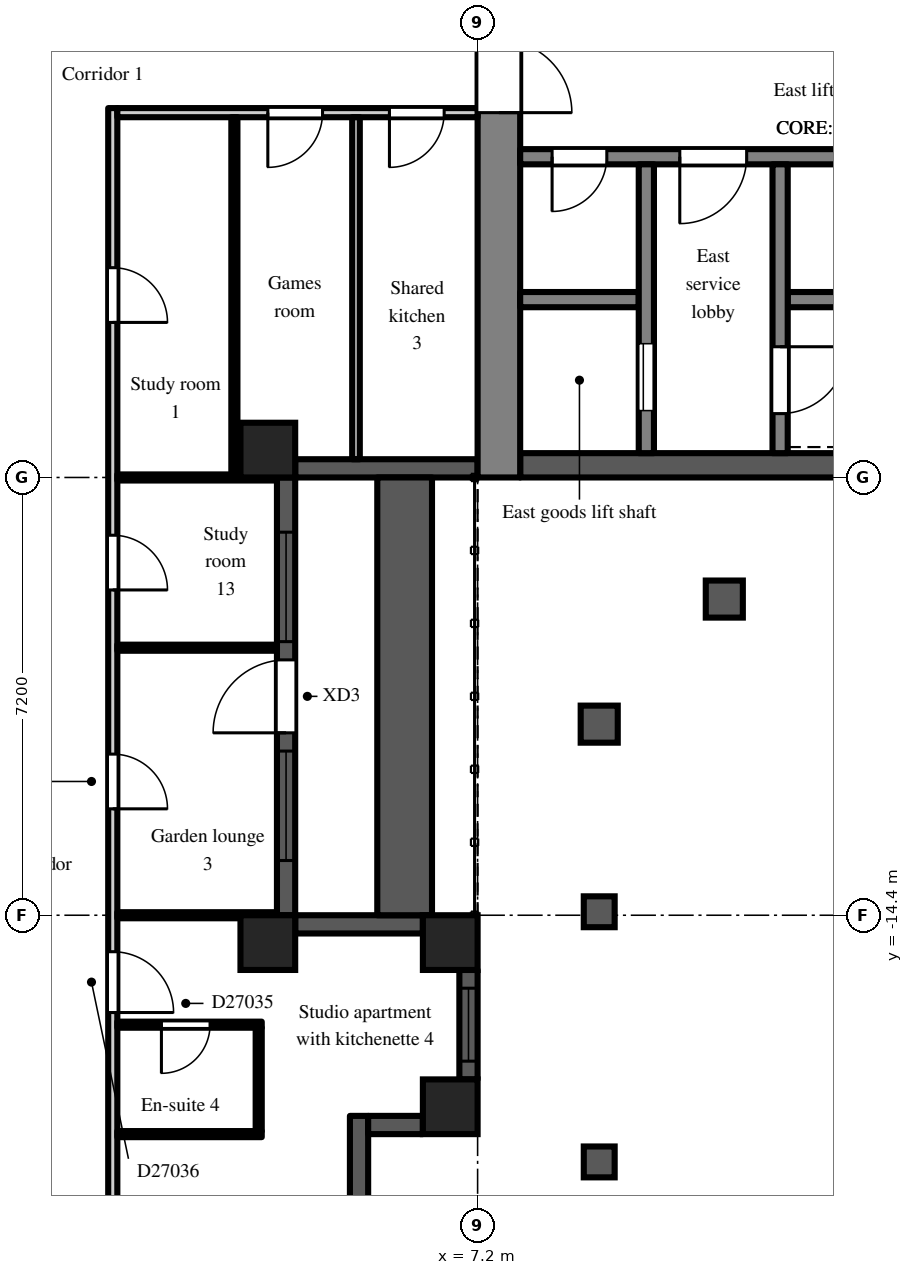
"""IFC4 building model, lengths in metres.
Left out: names, types, materials, properties, quantities, classifications, styles, units other than length and angle.
Written with IfcOpenShell. Run it as: python <this file> out.ifc"""

import sys

from ifc_helpers import new_model, si_unit, direction, frame, frame_2d, origin, origin_2d, place, context, subcontext, project, spatial, rectangle, extrude, element, fill, save


model = new_model("IFC4")
c1 = context("Model", 3, precision=1e-05, world=origin(), true_north=direction((0.0, 1.0)))
c2 = subcontext(c1, "Body", "Model", "MODEL_VIEW")
j1 = project(units=[si_unit("LENGTHUNIT", "METRE"), si_unit("PLANEANGLEUNIT", "RADIAN")], contexts=[c1])
p1 = place(None, origin())
s1 = spatial("IfcSite", under=j1, at=p1, CompositionType="ELEMENT")
p2 = place(p1, origin())
s2 = spatial("IfcBuilding", under=s1, at=p2, CompositionType="ELEMENT")
p3 = place(p2, frame((0.0, 0.0, 191.7)))
s3 = spatial("IfcBuildingStorey", under=s2, at=p3, CompositionType="ELEMENT", Elevation=191.7)
for number, where, z_axis, x_axis in (
    (1, (3.75, -14.85, 0.0), (0.0, 0.0, 1.0), (1.0, 0.0, 0.0)),
    (2, (3.75, -6.75, 0.0), (0.0, 0.0, 1.0), (1.0, 0.0, 0.0)),
    (3, (6.75, -17.55, 0.0), (0.0, 0.0, 1.0), (1.0, 0.0, 0.0)),
    (4, (6.75, -14.85, 0.0), (0.0, 0.0, 1.0), (1.0, 0.0, 0.0)),
):
    element("IfcColumn", number, at=place(p3, frame(where, z_axis=z_axis, x_axis=x_axis)), inside=s3, PredefinedType="COLUMN", context=c2, shape_type="SweptSolid", body=[
        extrude(rectangle(XDim=0.9, YDim=0.9, at=origin_2d()), origin(), (0.0, 0.0, 1.0), 3.0),
    ])
p4 = place(p3, frame((5.25, -19.5, 0.0), z_axis=(0.0, 0.0, 1.0), x_axis=(0.0, 1.0, 0.0)))
e5 = element("IfcWall", 5, at=p4, inside=s3, PredefinedType="SOLIDWALL", context=c2, shape_type="SweptSolid", body=[
    extrude(rectangle(XDim=1.8, YDim=0.3, at=frame_2d((0.9, 0.0))), origin(), (0.0, 0.0, 1.0), 2.55),
])
p5 = place(p3, frame((5.4, -17.85, 0.0), z_axis=(0.0, 0.0, 1.0), x_axis=(1.0, 0.0, 0.0)))
e6 = element("IfcWall", 6, at=p5, inside=s3, PredefinedType="SOLIDWALL", context=c2, shape_type="SweptSolid", body=[
    extrude(rectangle(XDim=0.9, YDim=0.3, at=frame_2d((0.45, 0.0))), origin(), (0.0, 0.0, 1.0), 2.55),
])
p6 = place(p3, frame((7.05, -17.1, 0.0), z_axis=(0.0, 0.0, 1.0), x_axis=(0.0, 1.0, 0.0)))
e7 = element("IfcWall", 7, at=p6, inside=s3, PredefinedType="SOLIDWALL", context=c2, shape_type="SweptSolid", body=[
    extrude(rectangle(XDim=1.8, YDim=0.3, at=frame_2d((0.9, 0.0))), origin(), (0.0, 0.0, 1.0), 2.3),
])
p7 = place(p6, frame((0.3, 0.0, 0.2)))
e8 = element("IfcOpeningElement", 8, at=p7, cuts=e7, PredefinedType="OPENING", context=c2, shape_type="SweptSolid", body=[
    extrude(rectangle(XDim=1.2, YDim=1.85, at=frame_2d((0.6, 0.925))), frame((0.0, 0.16, 0.0), z_axis=(0.0, -1.0, 0.0), x_axis=(1.0, 0.0, 0.0)), (0.0, 0.0, 1.0), 0.32),
])
p8 = place(p3, frame((6.3, -14.55, 0.0), z_axis=(0.0, 0.0, 1.0), x_axis=(-1.0, 0.0, 0.0)))
e9 = element("IfcWall", 9, at=p8, inside=s3, PredefinedType="SOLIDWALL", context=c2, shape_type="SweptSolid", body=[
    extrude(rectangle(XDim=2.1, YDim=0.3, at=frame_2d((1.05, 0.0))), origin(), (0.0, 0.0, 1.0), 2.55),
])
p9 = place(p3, frame((4.05, -14.4, 0.0), z_axis=(0.0, 0.0, 1.0), x_axis=(0.0, 1.0, 0.0)))
e10 = element("IfcWall", 10, at=p9, inside=s3, PredefinedType="SOLIDWALL", context=c2, shape_type="SweptSolid", body=[
    extrude(rectangle(XDim=7.2, YDim=0.3, at=frame_2d((3.6, 0.0))), origin(), (0.0, 0.0, 1.0), 2.55),
])
p10 = place(p9, frame((3.0, 0.0, 0.0)))
e11 = element("IfcOpeningElement", 11, at=p10, cuts=e10, PredefinedType="OPENING", context=c2, shape_type="SweptSolid", body=[
    extrude(rectangle(XDim=1.2, YDim=2.05, at=frame_2d((0.6, 1.025))), frame((0.0, 0.16, 0.0), z_axis=(0.0, -1.0, 0.0), x_axis=(1.0, 0.0, 0.0)), (0.0, 0.0, 1.0), 0.32),
])
p11 = place(p9, frame((0.9, 0.0, 0.2)))
e12 = element("IfcOpeningElement", 12, at=p11, cuts=e10, PredefinedType="OPENING", context=c2, shape_type="SweptSolid", body=[
    extrude(rectangle(XDim=1.8, YDim=1.85, at=frame_2d((0.9, 0.925))), frame((0.0, 0.16, 0.0), z_axis=(0.0, -1.0, 0.0), x_axis=(1.0, 0.0, 0.0)), (0.0, 0.0, 1.0), 0.32),
])
p12 = place(p9, frame((4.5, 0.0, 0.2)))
e13 = element("IfcOpeningElement", 13, at=p12, cuts=e10, PredefinedType="OPENING", context=c2, shape_type="SweptSolid", body=[
    extrude(rectangle(XDim=1.8, YDim=1.85, at=frame_2d((0.9, 0.925))), frame((0.0, 0.16, 0.0), z_axis=(0.0, -1.0, 0.0), x_axis=(1.0, 0.0, 0.0)), (0.0, 0.0, 1.0), 0.32),
])
p13 = place(p3, frame((4.2, -7.05, 0.0), z_axis=(0.0, 0.0, 1.0), x_axis=(1.0, 0.0, 0.0)))
e14 = element("IfcWall", 14, at=p13, inside=s3, PredefinedType="SOLIDWALL", context=c2, shape_type="SweptSolid", body=[
    extrude(rectangle(XDim=3.0, YDim=0.3, at=frame_2d((1.5, 0.0))), origin(), (0.0, 0.0, 1.0), 2.55),
])
p14 = place(p3, frame((6.0, -14.4, 0.0), z_axis=(0.0, 0.0, 1.0), x_axis=(0.0, 1.0, 0.0)))
e15 = element("IfcWall", 15, at=p14, inside=s3, PredefinedType="PARAPET", context=c2, shape_type="SweptSolid", body=[
    extrude(rectangle(XDim=7.2, YDim=0.9, at=frame_2d((3.6, 0.0))), origin(), (0.0, 0.0, 1.0), 0.8),
])
p15 = place(p3, frame((7.55, -7.2, 0.0), z_axis=(0.0, 0.0, 1.0), x_axis=(0.0, 1.0, 0.0)))
e16 = element("IfcWall", 16, at=p15, inside=s3, PredefinedType="SHEAR", context=c2, shape_type="SweptSolid", body=[
    extrude(rectangle(XDim=14.4, YDim=0.7, at=frame_2d((7.2, 0.0))), origin(), (0.0, 0.0, 1.0), 2.55),
])
p16 = place(p15, frame((6.0, 0.0, 0.0)))
e17 = element("IfcOpeningElement", 17, at=p16, cuts=e16, PredefinedType="OPENING", context=c2, shape_type="SweptSolid", body=[
    extrude(rectangle(XDim=2.4, YDim=2.2, at=frame_2d((1.2, 1.1))), frame((0.0, 0.36, 0.0), z_axis=(0.0, -1.0, 0.0), x_axis=(1.0, 0.0, 0.0)), (0.0, 0.0, 1.0), 0.72),
])
p17 = place(p3, frame((7.9, -7.0, 0.0), z_axis=(0.0, 0.0, 1.0), x_axis=(1.0, 0.0, 0.0)))
e18 = element("IfcWall", 18, at=p17, inside=s3, PredefinedType="SHEAR", context=c2, shape_type="SweptSolid", body=[
    extrude(rectangle(XDim=12.95, YDim=0.4, at=frame_2d((6.475, 0.0))), origin(), (0.0, 0.0, 1.0), 2.55),
])
p18 = place(p3, frame((7.9, -1.925, 0.0), z_axis=(0.0, 0.0, 1.0), x_axis=(1.0, 0.0, 0.0)))
e19 = element("IfcWall", 19, at=p18, inside=s3, PredefinedType="SHEAR", context=c2, shape_type="SweptSolid", body=[
    extrude(rectangle(XDim=12.95, YDim=0.25, at=frame_2d((6.475, 0.0))), origin(), (0.0, 0.0, 1.0), 2.55),
])
p19 = place(p18, frame((0.525, 0.0, 0.0)))
e20 = element("IfcOpeningElement", 20, at=p19, cuts=e19, PredefinedType="OPENING", context=c2, shape_type="SweptSolid", body=[
    extrude(rectangle(XDim=0.9, YDim=2.1, at=frame_2d((0.45, 1.05))), frame((0.0, 0.135, 0.0), z_axis=(0.0, -1.0, 0.0), x_axis=(1.0, 0.0, 0.0)), (0.0, 0.0, 1.0), 0.27),
])
p20 = place(p18, frame((2.625, 0.0, 0.0)))
e21 = element("IfcOpeningElement", 21, at=p20, cuts=e19, PredefinedType="OPENING", context=c2, shape_type="SweptSolid", body=[
    extrude(rectangle(XDim=1.1, YDim=2.1, at=frame_2d((0.55, 1.05))), frame((0.0, 0.135, 0.0), z_axis=(0.0, -1.0, 0.0), x_axis=(1.0, 0.0, 0.0)), (0.0, 0.0, 1.0), 0.27),
])
p21 = place(p18, frame((8.225, 0.0, 0.0)))
e22 = element("IfcOpeningElement", 22, at=p21, cuts=e19, PredefinedType="OPENING", context=c2, shape_type="SweptSolid", body=[
    extrude(rectangle(XDim=0.9, YDim=2.1, at=frame_2d((0.45, 1.05))), frame((0.0, 0.135, 0.0), z_axis=(0.0, -1.0, 0.0), x_axis=(1.0, 0.0, 0.0)), (0.0, 0.0, 1.0), 0.27),
])
p22 = place(p3, frame((7.9, -4.275, 0.0), z_axis=(0.0, 0.0, 1.0), x_axis=(1.0, 0.0, 0.0)))
e23 = element("IfcWall", 23, at=p22, inside=s3, PredefinedType="SHEAR", context=c2, shape_type="SweptSolid", body=[
    extrude(rectangle(XDim=1.95, YDim=0.25, at=frame_2d((0.975, 0.0))), origin(), (0.0, 0.0, 1.0), 2.55),
])
p23 = place(p3, frame((12.3, -4.275, 0.0), z_axis=(0.0, 0.0, 1.0), x_axis=(1.0, 0.0, 0.0)))
e24 = element("IfcWall", 24, at=p23, inside=s3, PredefinedType="SHEAR", context=c2, shape_type="SweptSolid", body=[
    extrude(rectangle(XDim=8.55, YDim=0.25, at=frame_2d((4.275, 0.0))), origin(), (0.0, 0.0, 1.0), 2.55),
])
p24 = place(p3, frame((9.975, -2.05, 0.0), z_axis=(0.0, 0.0, 1.0), x_axis=(0.0, -1.0, 0.0)))
e25 = element("IfcWall", 25, at=p24, inside=s3, PredefinedType="SHEAR", context=c2, shape_type="SweptSolid", body=[
    extrude(rectangle(XDim=4.75, YDim=0.25, at=frame_2d((2.375, 0.0))), origin(), (0.0, 0.0, 1.0), 2.55),
])
p25 = place(p24, frame((2.95, 0.0, 0.0)))
e26 = element("IfcOpeningElement", 26, at=p25, cuts=e25, PredefinedType="OPENING", context=c2, shape_type="SweptSolid", body=[
    extrude(rectangle(XDim=1.1, YDim=2.1, at=frame_2d((0.55, 1.05))), frame((0.0, 0.135, 0.0), z_axis=(0.0, -1.0, 0.0), x_axis=(1.0, 0.0, 0.0)), (0.0, 0.0, 1.0), 0.27),
])
p26 = place(p3, frame((12.175, -2.05, 0.0), z_axis=(0.0, 0.0, 1.0), x_axis=(0.0, -1.0, 0.0)))
e27 = element("IfcWall", 27, at=p26, inside=s3, PredefinedType="SHEAR", context=c2, shape_type="SweptSolid", body=[
    extrude(rectangle(XDim=4.75, YDim=0.25, at=frame_2d((2.375, 0.0))), origin(), (0.0, 0.0, 1.0), 2.55),
])
p27 = place(p26, frame((3.0, 0.0, 0.0)))
e28 = element("IfcOpeningElement", 28, at=p27, cuts=e27, PredefinedType="OPENING", context=c2, shape_type="SweptSolid", body=[
    extrude(rectangle(XDim=1.1, YDim=2.1, at=frame_2d((0.55, 1.05))), frame((0.0, 0.135, 0.0), z_axis=(0.0, -1.0, 0.0), x_axis=(1.0, 0.0, 0.0)), (0.0, 0.0, 1.0), 0.27),
])
p28 = place(p3, frame((1.2, -19.525, 0.0), z_axis=(0.0, 0.0, 1.0), x_axis=(0.0, 1.0, 0.0)))
e29 = element("IfcWall", 29, at=p28, inside=s3, PredefinedType="PARTITIONING", context=c2, shape_type="SweptSolid", body=[
    extrude(rectangle(XDim=18.4, YDim=0.15, at=frame_2d((9.2, 0.0))), origin(), (0.0, 0.0, 1.0), 2.55),
])
p29 = place(p28, frame((14.875, 0.0, 0.0)))
e30 = element("IfcOpeningElement", 30, at=p29, cuts=e29, PredefinedType="OPENING", context=c2, shape_type="SweptSolid", body=[
    extrude(rectangle(XDim=0.9, YDim=2.1, at=frame_2d((0.45, 1.05))), frame((0.0, 0.085, 0.0), z_axis=(0.0, -1.0, 0.0), x_axis=(1.0, 0.0, 0.0)), (0.0, 0.0, 1.0), 0.17),
])
p30 = place(p28, frame((10.475, 0.0, 0.0)))
e31 = element("IfcOpeningElement", 31, at=p30, cuts=e29, PredefinedType="OPENING", context=c2, shape_type="SweptSolid", body=[
    extrude(rectangle(XDim=0.9, YDim=2.1, at=frame_2d((0.45, 1.05))), frame((0.0, 0.085, 0.0), z_axis=(0.0, -1.0, 0.0), x_axis=(1.0, 0.0, 0.0)), (0.0, 0.0, 1.0), 0.17),
])
p31 = place(p28, frame((6.875, 0.0, 0.0)))
e32 = element("IfcOpeningElement", 32, at=p31, cuts=e29, PredefinedType="OPENING", context=c2, shape_type="SweptSolid", body=[
    extrude(rectangle(XDim=0.9, YDim=2.1, at=frame_2d((0.45, 1.05))), frame((0.0, 0.085, 0.0), z_axis=(0.0, -1.0, 0.0), x_axis=(1.0, 0.0, 0.0)), (0.0, 0.0, 1.0), 0.17),
])
p32 = place(p28, frame((3.525, 0.0, 0.0)))
e33 = element("IfcOpeningElement", 33, at=p32, cuts=e29, PredefinedType="OPENING", context=c2, shape_type="SweptSolid", body=[
    extrude(rectangle(XDim=1.0, YDim=2.1, at=frame_2d((0.5, 1.05))), frame((0.0, 0.085, 0.0), z_axis=(0.0, -1.0, 0.0), x_axis=(1.0, 0.0, 0.0)), (0.0, 0.0, 1.0), 0.17),
])
p33 = place(p3, frame((1.275, -18.0, 0.0), z_axis=(0.0, 0.0, 1.0), x_axis=(1.0, 0.0, 0.0)))
e34 = element("IfcWall", 34, at=p33, inside=s3, PredefinedType="PARTITIONING", context=c2, shape_type="SweptSolid", body=[
    extrude(rectangle(XDim=2.375, YDim=0.1, at=frame_2d((1.188, 0.0))), origin(), (0.0, 0.0, 1.0), 2.55),
])
p34 = place(p3, frame((1.275, -16.2, 0.0), z_axis=(0.0, 0.0, 1.0), x_axis=(1.0, 0.0, 0.0)))
e35 = element("IfcWall", 35, at=p34, inside=s3, PredefinedType="PARTITIONING", context=c2, shape_type="SweptSolid", body=[
    extrude(rectangle(XDim=2.375, YDim=0.1, at=frame_2d((1.188, 0.0))), origin(), (0.0, 0.0, 1.0), 2.55),
])
p35 = place(p34, frame((0.725, 0.0, 0.0)))
e36 = element("IfcOpeningElement", 36, at=p35, cuts=e35, PredefinedType="OPENING", context=c2, shape_type="SweptSolid", body=[
    extrude(rectangle(XDim=0.8, YDim=2.1, at=frame_2d((0.4, 1.05))), frame((0.0, 0.06, 0.0), z_axis=(0.0, -1.0, 0.0), x_axis=(1.0, 0.0, 0.0)), (0.0, 0.0, 1.0), 0.12),
])
for number, where, z_axis, x_axis in (
    (37, (1.275, -14.4, 0.0), (0.0, 0.0, 1.0), (1.0, 0.0, 0.0)),
    (38, (1.275, -10.0, 0.0), (0.0, 0.0, 1.0), (1.0, 0.0, 0.0)),
    (39, (1.275, -7.2, 0.0), (0.0, 0.0, 1.0), (1.0, 0.0, 0.0)),
):
    element("IfcWall", number, at=place(p3, frame(where, z_axis=z_axis, x_axis=x_axis)), inside=s3, PredefinedType="PARTITIONING", context=c2, shape_type="SweptSolid", body=[
        extrude(rectangle(XDim=2.625, YDim=0.1, at=frame_2d((1.312, 0.0))), origin(), (0.0, 0.0, 1.0), 2.55),
    ])
p36 = place(p3, frame((1.275, -1.2, 0.0), z_axis=(0.0, 0.0, 1.0), x_axis=(1.0, 0.0, 0.0)))
e40 = element("IfcWall", 40, at=p36, inside=s3, PredefinedType="PARTITIONING", context=c2, shape_type="SweptSolid", body=[
    extrude(rectangle(XDim=5.925, YDim=0.15, at=frame_2d((2.962, 0.0))), origin(), (0.0, 0.0, 1.0), 2.55),
])
p37 = place(p36, frame((2.475, 0.0, 0.0)))
e41 = element("IfcOpeningElement", 41, at=p37, cuts=e40, PredefinedType="OPENING", context=c2, shape_type="SweptSolid", body=[
    extrude(rectangle(XDim=0.9, YDim=2.1, at=frame_2d((0.45, 1.05))), frame((0.0, 0.085, 0.0), z_axis=(0.0, -1.0, 0.0), x_axis=(1.0, 0.0, 0.0)), (0.0, 0.0, 1.0), 0.17),
])
p38 = place(p36, frame((4.475, 0.0, 0.0)))
e42 = element("IfcOpeningElement", 42, at=p38, cuts=e40, PredefinedType="OPENING", context=c2, shape_type="SweptSolid", body=[
    extrude(rectangle(XDim=0.9, YDim=2.1, at=frame_2d((0.45, 1.05))), frame((0.0, 0.085, 0.0), z_axis=(0.0, -1.0, 0.0), x_axis=(1.0, 0.0, 0.0)), (0.0, 0.0, 1.0), 0.17),
])
p39 = place(p3, frame((3.2, -7.15, 0.0), z_axis=(0.0, 0.0, 1.0), x_axis=(0.0, 1.0, 0.0)))
e43 = element("IfcWall", 43, at=p39, inside=s3, PredefinedType="PARTITIONING", context=c2, shape_type="SweptSolid", body=[
    extrude(rectangle(XDim=5.875, YDim=0.1, at=frame_2d((2.938, 0.0))), origin(), (0.0, 0.0, 1.0), 2.55),
])
p40 = place(p3, frame((3.6, -17.95, 0.0), z_axis=(0.0, 0.0, 1.0), x_axis=(0.0, 1.0, 0.0)))
e44 = element("IfcWall", 44, at=p40, inside=s3, PredefinedType="PARTITIONING", context=c2, shape_type="SweptSolid", body=[
    extrude(rectangle(XDim=1.7, YDim=0.1, at=frame_2d((0.85, 0.0))), origin(), (0.0, 0.0, 1.0), 2.55),
])
p41 = place(p3, frame((5.2, -6.9, 0.0), z_axis=(0.0, 0.0, 1.0), x_axis=(0.0, 1.0, 0.0)))
e45 = element("IfcWall", 45, at=p41, inside=s3, PredefinedType="PARTITIONING", context=c2, shape_type="SweptSolid", body=[
    extrude(rectangle(XDim=5.625, YDim=0.125, at=frame_2d((2.812, 0.0))), origin(), (0.0, 0.0, 1.0), 2.55),
])
p42 = place(p7, origin())
e46 = element("IfcWindow", 46, at=p42, inside=s3, PartitioningType="SINGLE_PANEL", PredefinedType="WINDOW", context=c2, shape_type="SweptSolid", body=[
    extrude(rectangle(XDim=1.2, YDim=1.85, at=frame_2d((0.6, 0.925))), frame((0.0, 0.03, 0.0), z_axis=(0.0, -1.0, 0.0), x_axis=(1.0, 0.0, 0.0)), (0.0, 0.0, 1.0), 0.06),
])
fill(e8, e46)
p43 = place(p10, origin())
e47 = element("IfcDoor", 47, at=p43, inside=s3, OperationType="SINGLE_SWING_LEFT", PredefinedType="DOOR", context=c2, shape_type="SweptSolid", body=[
    extrude(rectangle(XDim=1.2, YDim=2.05, at=frame_2d((0.6, 1.025))), frame((0.0, 0.025, 0.0), z_axis=(0.0, -1.0, 0.0), x_axis=(1.0, 0.0, 0.0)), (0.0, 0.0, 1.0), 0.05),
])
fill(e11, e47)
p44 = place(p11, origin())
e48 = element("IfcWindow", 48, at=p44, inside=s3, PartitioningType="SINGLE_PANEL", PredefinedType="WINDOW", context=c2, shape_type="SweptSolid", body=[
    extrude(rectangle(XDim=1.8, YDim=1.85, at=frame_2d((0.9, 0.925))), frame((0.0, 0.03, 0.0), z_axis=(0.0, -1.0, 0.0), x_axis=(1.0, 0.0, 0.0)), (0.0, 0.0, 1.0), 0.06),
])
fill(e12, e48)
p45 = place(p12, origin())
e49 = element("IfcWindow", 49, at=p45, inside=s3, PartitioningType="SINGLE_PANEL", PredefinedType="WINDOW", context=c2, shape_type="SweptSolid", body=[
    extrude(rectangle(XDim=1.8, YDim=1.85, at=frame_2d((0.9, 0.925))), frame((0.0, 0.03, 0.0), z_axis=(0.0, -1.0, 0.0), x_axis=(1.0, 0.0, 0.0)), (0.0, 0.0, 1.0), 0.06),
])
fill(e13, e49)
p46 = place(p25, origin())
e50 = element("IfcDoor", 50, at=p46, inside=s3, OperationType="SLIDING_TO_LEFT", PredefinedType="DOOR", context=c2, shape_type="SweptSolid", body=[
    extrude(rectangle(XDim=1.1, YDim=2.1, at=frame_2d((0.55, 1.05))), frame((0.0, 0.025, 0.0), z_axis=(0.0, -1.0, 0.0), x_axis=(1.0, 0.0, 0.0)), (0.0, 0.0, 1.0), 0.05),
])
fill(e26, e50)
p47 = place(p27, origin())
e51 = element("IfcDoor", 51, at=p47, inside=s3, OperationType="SINGLE_SWING_LEFT", PredefinedType="DOOR", context=c2, shape_type="SweptSolid", body=[
    extrude(rectangle(XDim=1.1, YDim=2.1, at=frame_2d((0.55, 1.05))), frame((0.0, 0.025, 0.0), z_axis=(0.0, -1.0, 0.0), x_axis=(1.0, 0.0, 0.0)), (0.0, 0.0, 1.0), 0.05),
])
fill(e28, e51)
p48 = place(p19, frame((0.9, 0.0, 0.0), z_axis=(0.0, 0.0, 1.0), x_axis=(-1.0, 0.0, 0.0)))
e52 = element("IfcDoor", 52, at=p48, inside=s3, OperationType="SINGLE_SWING_RIGHT", PredefinedType="DOOR", context=c2, shape_type="SweptSolid", body=[
    extrude(rectangle(XDim=0.9, YDim=2.1, at=frame_2d((0.45, 1.05))), frame((0.0, 0.025, 0.0), z_axis=(0.0, -1.0, 0.0), x_axis=(1.0, 0.0, 0.0)), (0.0, 0.0, 1.0), 0.05),
])
fill(e20, e52)
p49 = place(p20, frame((1.1, 0.0, 0.0), z_axis=(0.0, 0.0, 1.0), x_axis=(-1.0, 0.0, 0.0)))
e53 = element("IfcDoor", 53, at=p49, inside=s3, OperationType="SINGLE_SWING_RIGHT", PredefinedType="DOOR", context=c2, shape_type="SweptSolid", body=[
    extrude(rectangle(XDim=1.1, YDim=2.1, at=frame_2d((0.55, 1.05))), frame((0.0, 0.025, 0.0), z_axis=(0.0, -1.0, 0.0), x_axis=(1.0, 0.0, 0.0)), (0.0, 0.0, 1.0), 0.05),
])
fill(e21, e53)
p50 = place(p16, frame((2.4, 0.0, 0.0), z_axis=(0.0, 0.0, 1.0), x_axis=(-1.0, 0.0, 0.0)))
e54 = element("IfcDoor", 54, at=p50, inside=s3, OperationType="DOUBLE_DOOR_DOUBLE_SWING", PredefinedType="DOOR", context=c2, shape_type="SweptSolid", body=[
    extrude(rectangle(XDim=2.4, YDim=2.2, at=frame_2d((1.2, 1.1))), frame((0.0, 0.025, 0.0), z_axis=(0.0, -1.0, 0.0), x_axis=(1.0, 0.0, 0.0)), (0.0, 0.0, 1.0), 0.05),
])
fill(e17, e54)
p51 = place(p29, frame((0.9, 0.0, 0.0), z_axis=(0.0, 0.0, 1.0), x_axis=(-1.0, 0.0, 0.0)))
e55 = element("IfcDoor", 55, at=p51, inside=s3, OperationType="SINGLE_SWING_RIGHT", PredefinedType="DOOR", context=c2, shape_type="SweptSolid", body=[
    extrude(rectangle(XDim=0.9, YDim=2.1, at=frame_2d((0.45, 1.05))), frame((0.0, 0.025, 0.0), z_axis=(0.0, -1.0, 0.0), x_axis=(1.0, 0.0, 0.0)), (0.0, 0.0, 1.0), 0.05),
])
fill(e30, e55)
p52 = place(p37, frame((0.9, 0.0, 0.0), z_axis=(0.0, 0.0, 1.0), x_axis=(-1.0, 0.0, 0.0)))
e56 = element("IfcDoor", 56, at=p52, inside=s3, OperationType="SINGLE_SWING_RIGHT", PredefinedType="DOOR", context=c2, shape_type="SweptSolid", body=[
    extrude(rectangle(XDim=0.9, YDim=2.1, at=frame_2d((0.45, 1.05))), frame((0.0, 0.025, 0.0), z_axis=(0.0, -1.0, 0.0), x_axis=(1.0, 0.0, 0.0)), (0.0, 0.0, 1.0), 0.05),
])
fill(e41, e56)
p53 = place(p38, frame((0.9, 0.0, 0.0), z_axis=(0.0, 0.0, 1.0), x_axis=(-1.0, 0.0, 0.0)))
e57 = element("IfcDoor", 57, at=p53, inside=s3, OperationType="SINGLE_SWING_RIGHT", PredefinedType="DOOR", context=c2, shape_type="SweptSolid", body=[
    extrude(rectangle(XDim=0.9, YDim=2.1, at=frame_2d((0.45, 1.05))), frame((0.0, 0.025, 0.0), z_axis=(0.0, -1.0, 0.0), x_axis=(1.0, 0.0, 0.0)), (0.0, 0.0, 1.0), 0.05),
])
fill(e42, e57)
p54 = place(p30, frame((0.9, 0.0, 0.0), z_axis=(0.0, 0.0, 1.0), x_axis=(-1.0, 0.0, 0.0)))
e58 = element("IfcDoor", 58, at=p54, inside=s3, OperationType="SINGLE_SWING_RIGHT", PredefinedType="DOOR", context=c2, shape_type="SweptSolid", body=[
    extrude(rectangle(XDim=0.9, YDim=2.1, at=frame_2d((0.45, 1.05))), frame((0.0, 0.025, 0.0), z_axis=(0.0, -1.0, 0.0), x_axis=(1.0, 0.0, 0.0)), (0.0, 0.0, 1.0), 0.05),
])
fill(e31, e58)
p55 = place(p31, frame((0.9, 0.0, 0.0), z_axis=(0.0, 0.0, 1.0), x_axis=(-1.0, 0.0, 0.0)))
e59 = element("IfcDoor", 59, at=p55, inside=s3, OperationType="SINGLE_SWING_RIGHT", PredefinedType="DOOR", context=c2, shape_type="SweptSolid", body=[
    extrude(rectangle(XDim=0.9, YDim=2.1, at=frame_2d((0.45, 1.05))), frame((0.0, 0.025, 0.0), z_axis=(0.0, -1.0, 0.0), x_axis=(1.0, 0.0, 0.0)), (0.0, 0.0, 1.0), 0.05),
])
fill(e32, e59)
p56 = place(p35, frame((0.8, 0.0, 0.0), z_axis=(0.0, 0.0, 1.0), x_axis=(-1.0, 0.0, 0.0)))
e60 = element("IfcDoor", 60, at=p56, inside=s3, OperationType="SINGLE_SWING_RIGHT", PredefinedType="DOOR", context=c2, shape_type="SweptSolid", body=[
    extrude(rectangle(XDim=0.8, YDim=2.1, at=frame_2d((0.4, 1.05))), frame((0.0, 0.025, 0.0), z_axis=(0.0, -1.0, 0.0), x_axis=(1.0, 0.0, 0.0)), (0.0, 0.0, 1.0), 0.05),
])
fill(e36, e60)
p57 = place(p32, frame((1.0, 0.0, 0.0), z_axis=(0.0, 0.0, 1.0), x_axis=(-1.0, 0.0, 0.0)))
e61 = element("IfcDoor", 61, at=p57, inside=s3, OperationType="SINGLE_SWING_RIGHT", PredefinedType="DOOR", context=c2, shape_type="SweptSolid", body=[
    extrude(rectangle(XDim=1.0, YDim=2.1, at=frame_2d((0.5, 1.05))), frame((0.0, 0.025, 0.0), z_axis=(0.0, -1.0, 0.0), x_axis=(1.0, 0.0, 0.0)), (0.0, 0.0, 1.0), 0.05),
])
fill(e33, e61)
save(model, sys.argv[1])
